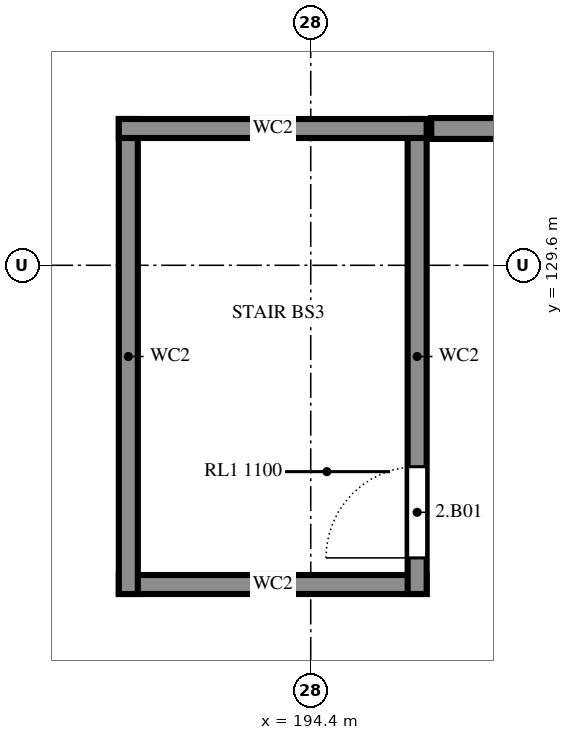
"""IFC4 building model, lengths in metres.
Left out: names, types, materials, properties, quantities, classifications, styles, units other than length and angle.
Written with IfcOpenShell. Run it as: python <this file> out.ifc"""

import sys

from ifc_helpers import new_model, si_unit, direction, frame, frame_2d, origin, place, context, subcontext, project, spatial, rectangle, extrude, element, fill, save


model = new_model("IFC4")
c1 = context("Model", 3, precision=1e-05, world=origin(), true_north=direction((0.0, 1.0)))
c2 = subcontext(c1, "Body", "Model", "MODEL_VIEW")
j1 = project(units=[si_unit("LENGTHUNIT", "METRE"), si_unit("PLANEANGLEUNIT", "RADIAN")], contexts=[c1])
p1 = place(None, origin())
s1 = spatial("IfcSite", under=j1, at=p1, CompositionType="ELEMENT")
p2 = place(p1, origin())
s2 = spatial("IfcBuilding", under=s1, at=p2, CompositionType="ELEMENT")
p3 = place(p2, frame((0.0, 0.0, 7.2)))
s3 = spatial("IfcBuildingStorey", under=s2, at=p3, CompositionType="ELEMENT", Elevation=7.2)
p4 = place(p3, frame((191.875, 125.4, 0.0), z_axis=(0.0, 0.0, 1.0), x_axis=(1.0, 0.0, 0.0)))
e1 = element("IfcWall", 1, at=p4, inside=s3, PredefinedType="SHEAR", context=c2, shape_type="SweptSolid", body=[
    extrude(rectangle(XDim=4.05, YDim=0.25, at=frame_2d((2.025, 0.0))), origin(), (0.0, 0.0, 1.0), 3.6),
])
p5 = place(p3, frame((195.8, 125.275, 0.0), z_axis=(0.0, 0.0, 1.0), x_axis=(0.0, 1.0, 0.0)))
e2 = element("IfcWall", 2, at=p5, inside=s3, PredefinedType="SHEAR", context=c2, shape_type="SweptSolid", body=[
    extrude(rectangle(XDim=6.25, YDim=0.25, at=frame_2d((3.125, 0.0))), origin(), (0.0, 0.0, 1.0), 3.6),
])
p6 = place(p5, frame((0.475, 0.0, 0.0)))
e3 = element("IfcOpeningElement", 3, at=p6, cuts=e2, PredefinedType="OPENING", context=c2, shape_type="SweptSolid", body=[
    extrude(rectangle(XDim=1.2, YDim=2.4, at=frame_2d((0.6, 1.2))), frame((0.0, 0.135, 0.0), z_axis=(0.0, -1.0, 0.0), x_axis=(1.0, 0.0, 0.0)), (0.0, 0.0, 1.0), 0.27),
])
p7 = place(p3, frame((192.0, 131.525, 0.0), z_axis=(0.0, 0.0, 1.0), x_axis=(0.0, -1.0, 0.0)))
e4 = element("IfcWall", 4, at=p7, inside=s3, PredefinedType="SHEAR", context=c2, shape_type="SweptSolid", body=[
    extrude(rectangle(XDim=6.25, YDim=0.25, at=frame_2d((3.125, 0.0))), origin(), (0.0, 0.0, 1.0), 3.6),
])
p8 = place(p3, frame((195.925, 131.4, 0.0), z_axis=(0.0, 0.0, 1.0), x_axis=(-1.0, 0.0, 0.0)))
e5 = element("IfcWall", 5, at=p8, inside=s3, PredefinedType="SHEAR", context=c2, shape_type="SweptSolid", body=[
    extrude(rectangle(XDim=4.05, YDim=0.25, at=frame_2d((2.025, 0.0))), origin(), (0.0, 0.0, 1.0), 3.6),
])
p9 = place(p3, frame((192.0, 122.64, 0.0), z_axis=(0.0, 0.0, 1.0), x_axis=(0.0, 1.0, 0.0)))
e6 = element("IfcWall", 6, at=p9, inside=s3, PredefinedType="PARTITIONING", context=c2, shape_type="SweptSolid", body=[
    extrude(rectangle(XDim=2.575, YDim=0.275, at=frame_2d((1.288, 0.0))), origin(), (0.0, 0.0, 1.0), 3.6),
])
p10 = place(p3, frame((195.985, 131.4, 0.0), z_axis=(0.0, 0.0, 1.0), x_axis=(1.0, 0.0, 0.0)))
e7 = element("IfcWall", 7, at=p10, inside=s3, PredefinedType="PARTITIONING", context=c2, shape_type="SweptSolid", body=[
    extrude(rectangle(XDim=3.352, YDim=0.275, at=frame_2d((1.676, 0.0))), origin(), (0.0, 0.0, 1.0), 3.6),
])
p11 = place(p6, origin())
e8 = element("IfcDoor", 8, at=p11, inside=s3, OperationType="SINGLE_SWING_RIGHT", PredefinedType="DOOR", context=c2, shape_type="SweptSolid", body=[
    extrude(rectangle(XDim=1.2, YDim=2.4, at=frame_2d((0.6, 1.2))), frame((0.0, 0.025, 0.0), z_axis=(0.0, -1.0, 0.0), x_axis=(1.0, 0.0, 0.0)), (0.0, 0.0, 1.0), 0.05),
])
fill(e3, e8)
save(model, sys.argv[1])
